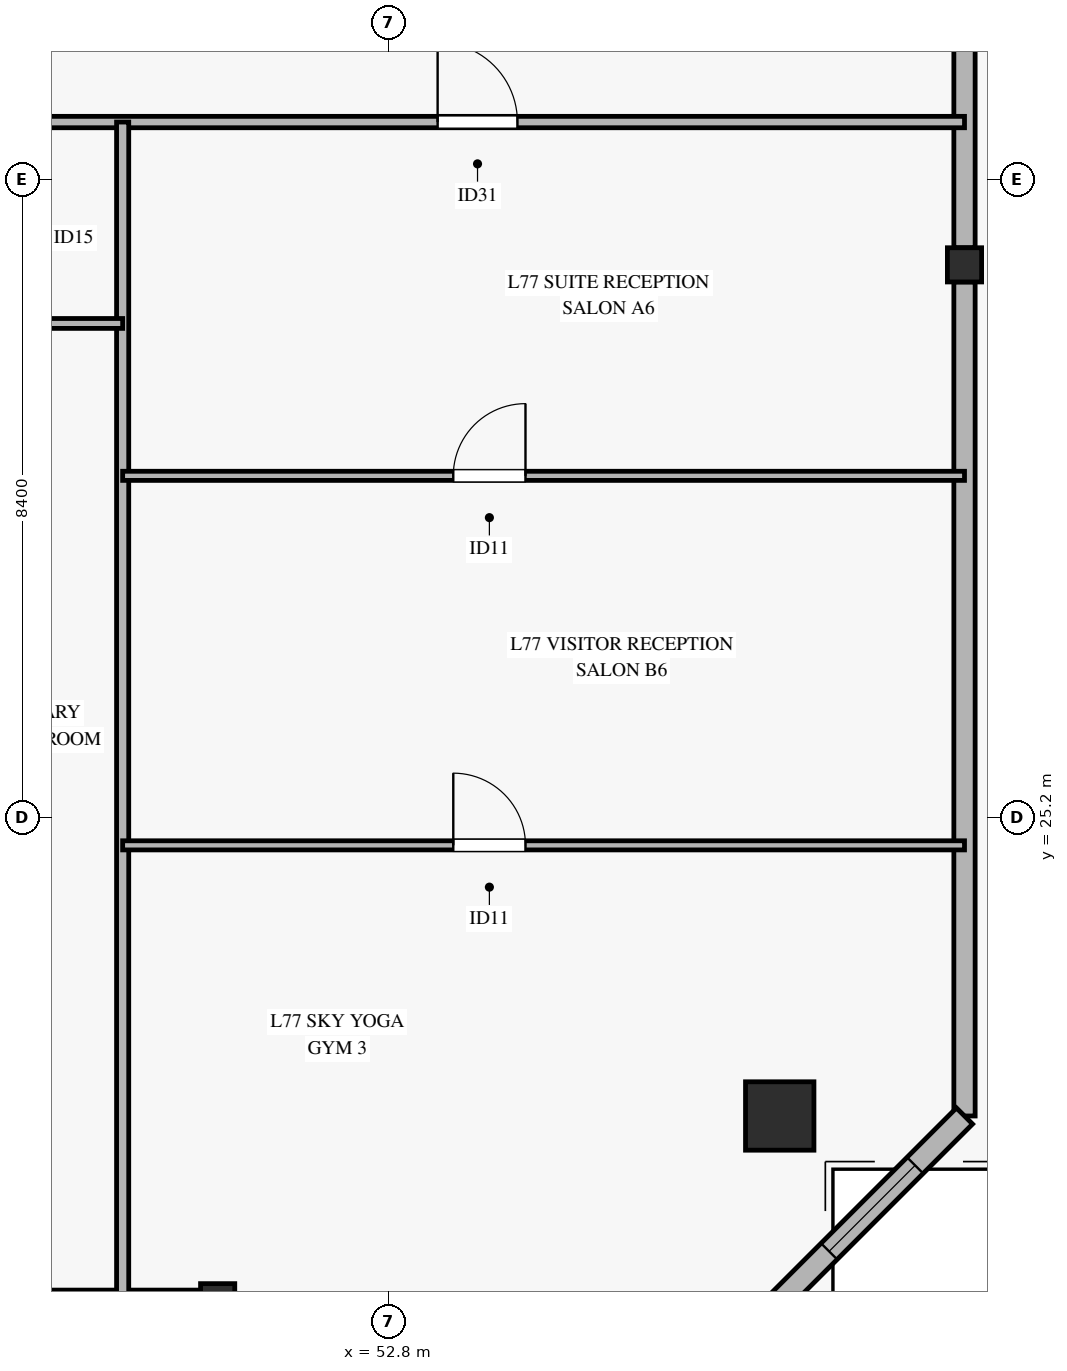
"""IFC4 building model, lengths in metres.
Left out: names, types, materials, properties, quantities, classifications, styles, units other than length and angle.
Written with IfcOpenShell. Run it as: python <this file> out.ifc"""

import sys

from ifc_helpers import new_model, si_unit, direction, frame, frame_2d, origin, origin_2d, place, context, subcontext, project, spatial, rectangle, hollow_rectangle, extrude, source, transform, mapped, element, fill, save


model = new_model("IFC4")
c1 = context("Model", 3, precision=1e-05, world=origin(), true_north=direction((0.0, 1.0)))
c2 = subcontext(c1, "Body", "Model", "MODEL_VIEW")
j1 = project(units=[si_unit("LENGTHUNIT", "METRE"), si_unit("PLANEANGLEUNIT", "RADIAN")], contexts=[c1])
p1 = place(None, origin())
s1 = spatial("IfcSite", under=j1, at=p1, CompositionType="ELEMENT")
p2 = place(p1, origin())
s2 = spatial("IfcBuilding", under=s1, at=p2, CompositionType="ELEMENT")
p3 = place(p2, frame((0.0, 0.0, 300.6)))
s3 = spatial("IfcBuildingStorey", under=s2, at=p3, CompositionType="ELEMENT", Elevation=300.6)
m1 = source(origin(), c2, "Body", "SweptSolid", [
    extrude(hollow_rectangle(XDim=0.9, YDim=0.9, WallThickness=0.04, at=origin_2d()), origin(), (0.0, 0.0, 1.0), 3.326),
])
p4 = place(p3, frame((57.945, 21.272, 0.0), z_axis=(-0.111274962345, 0.266076344656, 0.957507838908), x_axis=(-0.922571641766, -0.38582582315, 0.0)))
e1 = element("IfcColumn", 1, at=p4, inside=s3, PredefinedType="COLUMN", context=c2, shape_type="MappedRepresentation", body=[
    mapped(m1, transform((0.0, 0.0, 0.0), x_axis=(1.0, 0.0, 0.0), y_axis=(0.0, 1.0, 0.0), z_axis=(0.0, 0.0, 1.0), scale=1.0)),
])
m2 = source(origin(), c2, "Body", "SweptSolid", [
    extrude(hollow_rectangle(XDim=0.45, YDim=0.45, WallThickness=0.022, at=origin_2d()), origin(), (0.0, 0.0, 1.0), 3.318),
])
p5 = place(p3, frame((50.55, 18.841, 0.0), z_axis=(0.0, 0.28055656303, 0.959837494027), x_axis=(-1.0, 0.0, 0.0)))
e2 = element("IfcColumn", 2, at=p5, inside=s3, PredefinedType="COLUMN", context=c2, shape_type="MappedRepresentation", body=[
    mapped(m2, transform((0.0, 0.0, 0.0), x_axis=(1.0, 0.0, 0.0), y_axis=(0.0, 1.0, 0.0), z_axis=(0.0, 0.0, 1.0), scale=1.0)),
])
m3 = source(origin(), c2, "Body", "SweptSolid", [
    extrude(hollow_rectangle(XDim=0.45, YDim=0.45, WallThickness=0.022, at=origin_2d()), origin(), (0.0, 0.0, 1.0), 3.245),
])
p6 = place(p3, frame((60.376, 32.471, 0.0), z_axis=(-0.128187471658, 0.143308176941, 0.981341295642), x_axis=(-0.745333400914, -0.666691923967, 0.0)))
e3 = element("IfcColumn", 3, at=p6, inside=s3, PredefinedType="COLUMN", context=c2, shape_type="MappedRepresentation", body=[
    mapped(m3, transform((0.0, 0.0, 0.0), x_axis=(1.0, 0.0, 0.0), y_axis=(0.0, 1.0, 0.0), z_axis=(0.0, 0.0, 1.0), scale=1.0)),
])
p7 = place(p3, frame((44.525, 18.841, 0.0), z_axis=(0.0, 0.0, 1.0), x_axis=(1.0, 0.0, 0.0)))
e4 = element("IfcWall", 4, at=p7, inside=s3, PredefinedType="SOLIDWALL", context=c2, shape_type="SweptSolid", body=[
    extrude(rectangle(XDim=5.8, YDim=0.28, at=frame_2d((2.9, 0.0))), origin(), (0.0, 0.0, 1.0), 2.815),
])
p8 = place(p7, frame((1.975, 0.0, 0.0)))
e5 = element("IfcOpeningElement", 5, at=p8, cuts=e4, PredefinedType="OPENING", context=c2, shape_type="SweptSolid", body=[
    extrude(rectangle(XDim=1.8, YDim=2.25, at=frame_2d((0.9, 1.125))), frame((0.0, 0.15, 0.0), z_axis=(0.0, -1.0, 0.0), x_axis=(1.0, 0.0, 0.0)), (0.0, 0.0, 1.0), 0.3),
])
p9 = place(p3, frame((60.376, 21.272, 0.0), z_axis=(0.0, 0.0, 1.0), x_axis=(0.0, 1.0, 0.0)))
e6 = element("IfcWall", 6, at=p9, inside=s3, PredefinedType="SOLIDWALL", context=c2, shape_type="SweptSolid", body=[
    extrude(rectangle(XDim=10.974, YDim=0.28, at=frame_2d((5.487, 0.0))), origin(), (0.0, 0.0, 1.0), 2.815),
])
p10 = place(p3, frame((60.376, 32.696, 0.0), z_axis=(0.0, 0.0, 1.0), x_axis=(0.0, 1.0, 0.0)))
e7 = element("IfcWall", 7, at=p10, inside=s3, PredefinedType="SOLIDWALL", context=c2, shape_type="SweptSolid", body=[
    extrude(rectangle(XDim=10.973, YDim=0.28, at=frame_2d((5.486, 0.0))), origin(), (0.0, 0.0, 1.0), 2.815),
])
p11 = place(p10, frame((5.159, 0.0, 0.45)))
e8 = element("IfcOpeningElement", 8, at=p11, cuts=e7, PredefinedType="OPENING", context=c2, shape_type="SweptSolid", body=[
    extrude(rectangle(XDim=2.2, YDim=2.1, at=frame_2d((1.1, 1.05))), frame((0.0, 0.15, 0.0), z_axis=(0.0, -1.0, 0.0), x_axis=(1.0, 0.0, 0.0)), (0.0, 0.0, 1.0), 0.3),
])
p12 = place(p3, frame((57.945, 18.841, 0.0), z_axis=(0.0, 0.0, 1.0), x_axis=(0.707106781187, 0.707106781187, 0.0)))
e9 = element("IfcWall", 9, at=p12, inside=s3, PredefinedType="SOLIDWALL", context=c2, shape_type="SweptSolid", body=[
    extrude(rectangle(XDim=3.438, YDim=0.3, at=frame_2d((1.719, 0.0))), origin(), (0.0, 0.0, 1.0), 2.815),
])
p13 = place(p12, frame((0.919, 0.0, 0.45)))
e10 = element("IfcOpeningElement", 10, at=p13, cuts=e9, PredefinedType="OPENING", context=c2, shape_type="SweptSolid", body=[
    extrude(rectangle(XDim=1.6, YDim=2.0, at=frame_2d((0.8, 1.0))), frame((0.0, 0.16, 0.0), z_axis=(0.0, -1.0, 0.0), x_axis=(1.0, 0.0, 0.0)), (0.0, 0.0, 1.0), 0.32),
])
p14 = place(p3, frame((10.024, 34.35, 0.0), z_axis=(0.0, 0.0, 1.0), x_axis=(1.0, 0.0, 0.0)))
e11 = element("IfcWall", 11, at=p14, inside=s3, PredefinedType="PARTITIONING", context=c2, shape_type="SweptSolid", body=[
    extrude(rectangle(XDim=50.352, YDim=0.15, at=frame_2d((25.176, 0.0))), origin(), (0.0, 0.0, 1.0), 2.47),
])
p15 = place(p14, frame((5.406, 0.0, 0.0)))
e12 = element("IfcOpeningElement", 12, at=p15, cuts=e11, PredefinedType="OPENING", context=c2, shape_type="SweptSolid", body=[
    extrude(rectangle(XDim=1.05, YDim=2.15, at=frame_2d((0.525, 1.075))), frame((0.0, 0.085, 0.0), z_axis=(0.0, -1.0, 0.0), x_axis=(1.0, 0.0, 0.0)), (0.0, 0.0, 1.0), 0.17),
])
p16 = place(p14, frame((15.651, 0.0, 0.0)))
e13 = element("IfcOpeningElement", 13, at=p16, cuts=e11, PredefinedType="OPENING", context=c2, shape_type="SweptSolid", body=[
    extrude(rectangle(XDim=1.05, YDim=2.15, at=frame_2d((0.525, 1.075))), frame((0.0, 0.085, 0.0), z_axis=(0.0, -1.0, 0.0), x_axis=(1.0, 0.0, 0.0)), (0.0, 0.0, 1.0), 0.17),
])
p17 = place(p14, frame((22.129, 0.0, 0.0)))
e14 = element("IfcOpeningElement", 14, at=p17, cuts=e11, PredefinedType="OPENING", context=c2, shape_type="SweptSolid", body=[
    extrude(rectangle(XDim=1.05, YDim=2.15, at=frame_2d((0.525, 1.075))), frame((0.0, 0.085, 0.0), z_axis=(0.0, -1.0, 0.0), x_axis=(1.0, 0.0, 0.0)), (0.0, 0.0, 1.0), 0.17),
])
p18 = place(p14, frame((29.151, 0.0, 0.0)))
e15 = element("IfcOpeningElement", 15, at=p18, cuts=e11, PredefinedType="OPENING", context=c2, shape_type="SweptSolid", body=[
    extrude(rectangle(XDim=1.05, YDim=2.15, at=frame_2d((0.525, 1.075))), frame((0.0, 0.085, 0.0), z_axis=(0.0, -1.0, 0.0), x_axis=(1.0, 0.0, 0.0)), (0.0, 0.0, 1.0), 0.17),
])
p19 = place(p14, frame((35.701, 0.0, 0.0)))
e16 = element("IfcOpeningElement", 16, at=p19, cuts=e11, PredefinedType="OPENING", context=c2, shape_type="SweptSolid", body=[
    extrude(rectangle(XDim=1.05, YDim=2.15, at=frame_2d((0.525, 1.075))), frame((0.0, 0.085, 0.0), z_axis=(0.0, -1.0, 0.0), x_axis=(1.0, 0.0, 0.0)), (0.0, 0.0, 1.0), 0.17),
])
p20 = place(p14, frame((43.42, 0.0, 0.0)))
e17 = element("IfcOpeningElement", 17, at=p20, cuts=e11, PredefinedType="OPENING", context=c2, shape_type="SweptSolid", body=[
    extrude(rectangle(XDim=1.05, YDim=2.15, at=frame_2d((0.525, 1.075))), frame((0.0, 0.085, 0.0), z_axis=(0.0, -1.0, 0.0), x_axis=(1.0, 0.0, 0.0)), (0.0, 0.0, 1.0), 0.17),
])
p21 = place(p3, frame((49.3, 18.841, 0.0), z_axis=(0.0, 0.0, 1.0), x_axis=(0.0, 1.0, 0.0)))
e18 = element("IfcWall", 18, at=p21, inside=s3, PredefinedType="PARTITIONING", context=c2, shape_type="SweptSolid", body=[
    extrude(rectangle(XDim=15.509, YDim=0.16, at=frame_2d((7.754, 0.0))), origin(), (0.0, 0.0, 1.0), 2.77),
])
p22 = place(p3, frame((47.685, 31.7, 0.0), z_axis=(0.0, 0.0, 1.0), x_axis=(1.0, 0.0, 0.0)))
e19 = element("IfcWall", 19, at=p22, inside=s3, PredefinedType="PARTITIONING", context=c2, shape_type="SweptSolid", body=[
    extrude(rectangle(XDim=1.615, YDim=0.13, at=frame_2d((0.808, 0.0))), origin(), (0.0, 0.0, 1.0), 3.185),
])
p23 = place(p3, frame((49.3, 24.833, 0.0), z_axis=(0.0, 0.0, 1.0), x_axis=(1.0, 0.0, 0.0)))
e20 = element("IfcWall", 20, at=p23, inside=s3, PredefinedType="PARTITIONING", context=c2, shape_type="SweptSolid", body=[
    extrude(rectangle(XDim=11.076, YDim=0.12, at=frame_2d((5.538, 0.0))), origin(), (0.0, 0.0, 1.0), 2.47),
])
p24 = place(p23, frame((4.35, 0.0, 0.0)))
e21 = element("IfcOpeningElement", 21, at=p24, cuts=e20, PredefinedType="OPENING", context=c2, shape_type="SweptSolid", body=[
    extrude(rectangle(XDim=0.95, YDim=2.1, at=frame_2d((0.475, 1.05))), frame((0.0, 0.07, 0.0), z_axis=(0.0, -1.0, 0.0), x_axis=(1.0, 0.0, 0.0)), (0.0, 0.0, 1.0), 0.14),
])
p25 = place(p3, frame((49.3, 29.695, 0.0), z_axis=(0.0, 0.0, 1.0), x_axis=(1.0, 0.0, 0.0)))
e22 = element("IfcWall", 22, at=p25, inside=s3, PredefinedType="PARTITIONING", context=c2, shape_type="SweptSolid", body=[
    extrude(rectangle(XDim=11.076, YDim=0.12, at=frame_2d((5.538, 0.0))), origin(), (0.0, 0.0, 1.0), 2.47),
])
p26 = place(p25, frame((4.35, 0.0, 0.0)))
e23 = element("IfcOpeningElement", 23, at=p26, cuts=e22, PredefinedType="OPENING", context=c2, shape_type="SweptSolid", body=[
    extrude(rectangle(XDim=0.95, YDim=2.1, at=frame_2d((0.475, 1.05))), frame((0.0, 0.07, 0.0), z_axis=(0.0, -1.0, 0.0), x_axis=(1.0, 0.0, 0.0)), (0.0, 0.0, 1.0), 0.14),
])
m4 = source(origin(), c2, "Body", "SweptSolid", [
    extrude(rectangle(XDim=1.6, YDim=2.0, at=frame_2d((0.8, 1.0))), frame((0.0, 0.03, 0.0), z_axis=(0.0, -1.0, 0.0), x_axis=(1.0, 0.0, 0.0)), (0.0, 0.0, 1.0), 0.06),
])
p27 = place(p13, origin())
e24 = element("IfcWindow", 24, at=p27, inside=s3, PartitioningType="SINGLE_PANEL", PredefinedType="WINDOW", context=c2, shape_type="MappedRepresentation", body=[
    mapped(m4, transform((0.0, 0.0, 0.0), x_axis=(1.0, 0.0, 0.0), y_axis=(0.0, 1.0, 0.0), z_axis=(0.0, 0.0, 1.0), scale=1.0)),
])
fill(e10, e24)
m5 = source(origin(), c2, "Body", "SweptSolid", [
    extrude(rectangle(XDim=1.05, YDim=2.15, at=frame_2d((0.525, 1.075))), frame((0.0, 0.025, 0.0), z_axis=(0.0, -1.0, 0.0), x_axis=(1.0, 0.0, 0.0)), (0.0, 0.0, 1.0), 0.05),
])
p28 = place(p20, origin())
e25 = element("IfcDoor", 25, at=p28, inside=s3, OperationType="SINGLE_SWING_LEFT", PredefinedType="DOOR", context=c2, shape_type="MappedRepresentation", body=[
    mapped(m5, transform((0.0, 0.0, 0.0), x_axis=(1.0, 0.0, 0.0), y_axis=(0.0, 1.0, 0.0), z_axis=(0.0, 0.0, 1.0), scale=1.0)),
])
fill(e17, e25)
m6 = source(origin(), c2, "Body", "SweptSolid", [
    extrude(rectangle(XDim=0.95, YDim=2.1, at=frame_2d((0.475, 1.05))), frame((0.0, 0.025, 0.0), z_axis=(0.0, -1.0, 0.0), x_axis=(1.0, 0.0, 0.0)), (0.0, 0.0, 1.0), 0.05),
])
p29 = place(p26, origin())
e26 = element("IfcDoor", 26, at=p29, inside=s3, OperationType="SINGLE_SWING_RIGHT", PredefinedType="DOOR", context=c2, shape_type="MappedRepresentation", body=[
    mapped(m6, transform((0.0, 0.0, 0.0), x_axis=(1.0, 0.0, 0.0), y_axis=(0.0, 1.0, 0.0), z_axis=(0.0, 0.0, 1.0), scale=1.0)),
])
fill(e23, e26)
p30 = place(p24, origin())
e27 = element("IfcDoor", 27, at=p30, inside=s3, OperationType="SINGLE_SWING_LEFT", PredefinedType="DOOR", context=c2, shape_type="MappedRepresentation", body=[
    mapped(m6, transform((0.0, 0.0, 0.0), x_axis=(1.0, 0.0, 0.0), y_axis=(0.0, 1.0, 0.0), z_axis=(0.0, 0.0, 1.0), scale=1.0)),
])
fill(e21, e27)
save(model, sys.argv[1])
